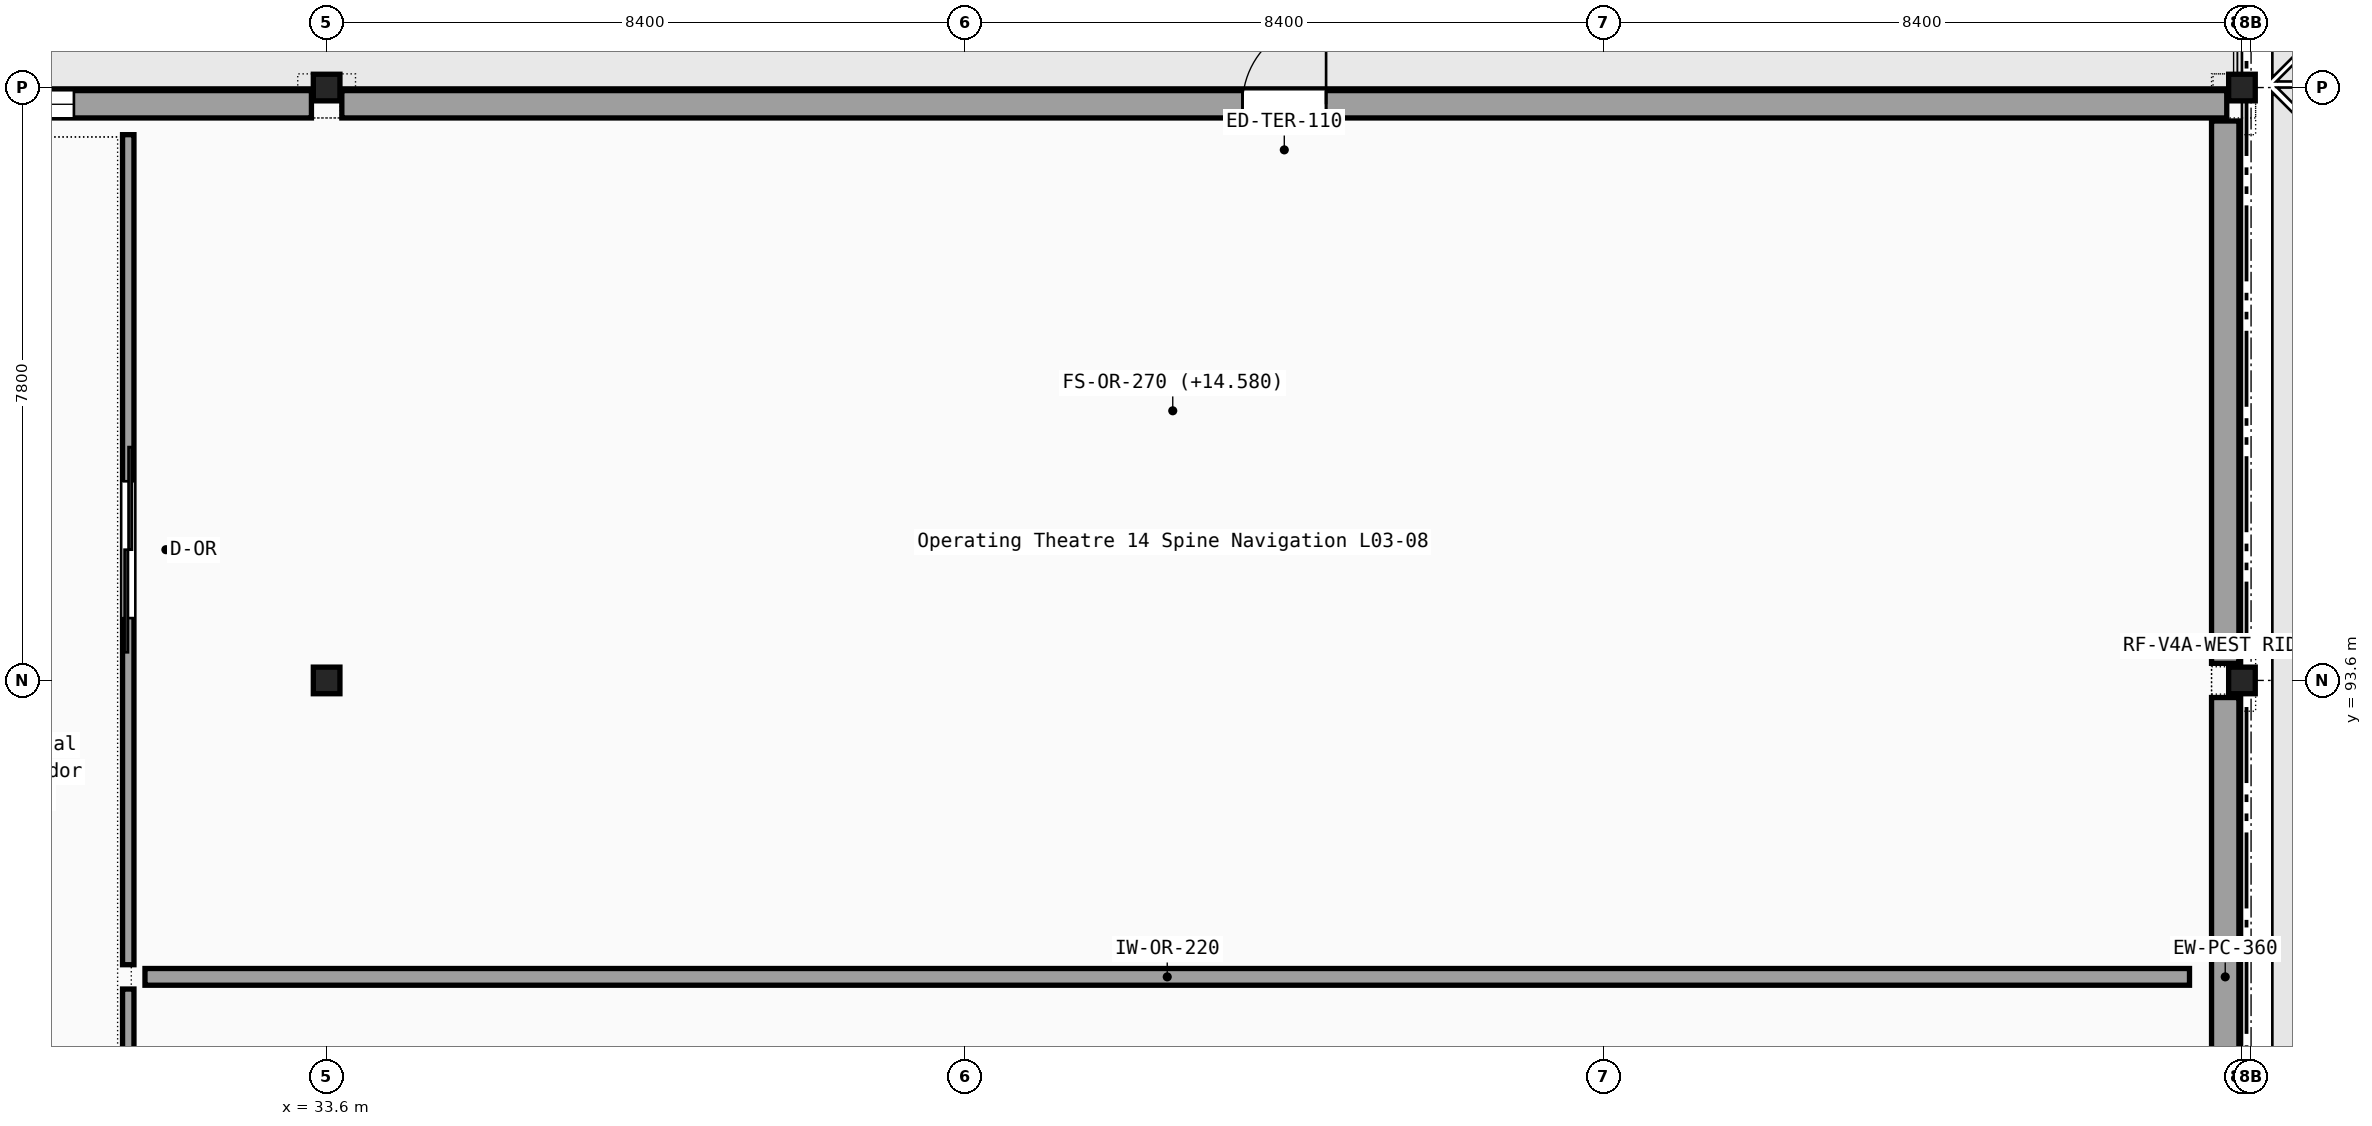
"""IFC4 building model, lengths in metres.
Left out: names, types, materials, properties, quantities, classifications, styles, units other than length and angle.
Written with IfcOpenShell. Run it as: python <this file> out.ifc"""

import sys

from ifc_helpers import new_model, si_unit, direction, frame, frame_2d, origin, origin_2d, place, context, subcontext, project, spatial, rectangle, i_section, extrude, element, fill, save


model = new_model("IFC4")
c1 = context("Model", 3, precision=1e-05, world=origin(), true_north=direction((0.0, 1.0)))
c2 = subcontext(c1, "Body", "Model", "MODEL_VIEW")
j1 = project(units=[si_unit("LENGTHUNIT", "METRE"), si_unit("PLANEANGLEUNIT", "RADIAN")], contexts=[c1])
p1 = place(None, origin())
s1 = spatial("IfcSite", under=j1, at=p1, CompositionType="ELEMENT")
p2 = place(p1, origin())
s2 = spatial("IfcBuilding", under=s1, at=p2, CompositionType="ELEMENT")
p3 = place(p2, frame((0.0, 0.0, 14.85)))
s3 = spatial("IfcBuildingStorey", under=s2, at=p3, CompositionType="ELEMENT", Elevation=14.85)
for number, where, z_axis, x_axis in (
    (1, (33.6, 93.6, 0.0), (0.0, 0.0, 1.0), (1.0, 0.0, 0.0)),
    (2, (33.6, 101.4, 0.0), (0.0, 0.0, 1.0), (1.0, 0.0, 0.0)),
    (3, (58.8, 93.6, 0.0), (0.0, 0.0, 1.0), (1.0, 0.0, 0.0)),
    (4, (58.8, 101.4, 0.0), (0.0, 0.0, 1.0), (1.0, 0.0, 0.0)),
):
    element("IfcColumn", number, at=place(p3, frame(where, z_axis=z_axis, x_axis=x_axis)), inside=s3, PredefinedType="COLUMN", context=c2, shape_type="SweptSolid", body=[
        extrude(i_section(OverallWidth=0.3, OverallDepth=0.35, WebThickness=0.01, FlangeThickness=0.018, FilletRadius=0.027, at=origin_2d()), origin(), (0.0, 0.0, 1.0), 4.05),
    ])
p4 = place(p3, frame((25.4, 101.18, 0.0), z_axis=(0.0, 0.0, 1.0), x_axis=(1.0, 0.0, 0.0)))
e5 = element("IfcWall", 5, at=p4, inside=s3, PredefinedType="SOLIDWALL", context=c2, shape_type="SweptSolid", body=[
    extrude(rectangle(XDim=8.0, YDim=0.36, at=frame_2d((4.0, 0.0))), origin(), (0.0, 0.0, 1.0), 3.44),
])
p5 = place(p4, frame((3.125, 0.0, 0.75)))
e6 = element("IfcOpeningElement", 6, at=p5, cuts=e5, PredefinedType="OPENING", context=c2, shape_type="SweptSolid", body=[
    extrude(rectangle(XDim=1.75, YDim=1.9, at=frame_2d((0.875, 0.95))), frame((0.0, 0.19, 0.0), z_axis=(0.0, -1.0, 0.0), x_axis=(1.0, 0.0, 0.0)), (0.0, 0.0, 1.0), 0.38),
])
p6 = place(p3, frame((33.8, 101.18, 0.0), z_axis=(0.0, 0.0, 1.0), x_axis=(1.0, 0.0, 0.0)))
e7 = element("IfcWall", 7, at=p6, inside=s3, PredefinedType="SOLIDWALL", context=c2, shape_type="SweptSolid", body=[
    extrude(rectangle(XDim=24.8, YDim=0.36, at=frame_2d((12.4, 0.0))), origin(), (0.0, 0.0, 1.0), 3.44),
])
p7 = place(p6, frame((11.85, 0.0, 0.0)))
e8 = element("IfcOpeningElement", 8, at=p7, cuts=e7, PredefinedType="OPENING", context=c2, shape_type="SweptSolid", body=[
    extrude(rectangle(XDim=1.1, YDim=2.2, at=frame_2d((0.55, 1.1))), frame((0.0, 0.19, 0.0), z_axis=(0.0, -1.0, 0.0), x_axis=(1.0, 0.0, 0.0)), (0.0, 0.0, 1.0), 0.38),
])
p8 = place(p3, frame((58.58, 86.025, 0.0), z_axis=(0.0, 0.0, 1.0), x_axis=(0.0, 1.0, 0.0)))
e9 = element("IfcWall", 9, at=p8, inside=s3, PredefinedType="SOLIDWALL", context=c2, shape_type="SweptSolid", body=[
    extrude(rectangle(XDim=7.35, YDim=0.36, at=frame_2d((3.675, 0.0))), origin(), (0.0, 0.0, 1.0), 3.44),
])
p9 = place(p3, frame((58.58, 93.825, 0.0), z_axis=(0.0, 0.0, 1.0), x_axis=(0.0, 1.0, 0.0)))
e10 = element("IfcWall", 10, at=p9, inside=s3, PredefinedType="SOLIDWALL", context=c2, shape_type="SweptSolid", body=[
    extrude(rectangle(XDim=7.135, YDim=0.36, at=frame_2d((3.567, 0.0))), origin(), (0.0, 0.0, 1.0), 3.44),
])
p10 = place(p3, frame((30.99, 78.62, 0.0), z_axis=(0.0, 0.0, 1.0), x_axis=(0.0, 1.0, 0.0)))
e11 = element("IfcWall", 11, at=p10, inside=s3, PredefinedType="PARTITIONING", context=c2, shape_type="SweptSolid", body=[
    extrude(rectangle(XDim=10.92, YDim=0.15, at=frame_2d((5.46, 0.0))), origin(), (0.0, 0.0, 1.0), 3.77),
])
p11 = place(p10, frame((4.56, 0.0, 0.0)))
e12 = element("IfcOpeningElement", 12, at=p11, cuts=e11, PredefinedType="OPENING", context=c2, shape_type="SweptSolid", body=[
    extrude(rectangle(XDim=1.8, YDim=2.4, at=frame_2d((0.9, 1.2))), frame((0.0, 0.085, 0.0), z_axis=(0.0, -1.0, 0.0), x_axis=(1.0, 0.0, 0.0)), (0.0, 0.0, 1.0), 0.17),
])
p12 = place(p3, frame((31.21, 89.7, 0.0), z_axis=(0.0, 0.0, 1.0), x_axis=(1.0, 0.0, 0.0)))
e13 = element("IfcWall", 13, at=p12, inside=s3, PredefinedType="PARTITIONING", context=c2, shape_type="SweptSolid", body=[
    extrude(rectangle(XDim=26.9, YDim=0.22, at=frame_2d((13.45, 0.0))), origin(), (0.0, 0.0, 1.0), 3.77),
])
p13 = place(p3, frame((30.99, 89.86, 0.0), z_axis=(0.0, 0.0, 1.0), x_axis=(0.0, 1.0, 0.0)))
e14 = element("IfcWall", 14, at=p13, inside=s3, PredefinedType="PARTITIONING", context=c2, shape_type="SweptSolid", body=[
    extrude(rectangle(XDim=10.92, YDim=0.15, at=frame_2d((5.46, 0.0))), origin(), (0.0, 0.0, 1.0), 3.44),
])
p14 = place(p13, frame((4.56, 0.0, 0.0)))
e15 = element("IfcOpeningElement", 15, at=p14, cuts=e14, PredefinedType="OPENING", context=c2, shape_type="SweptSolid", body=[
    extrude(rectangle(XDim=1.8, YDim=2.4, at=frame_2d((0.9, 1.2))), frame((0.0, 0.085, 0.0), z_axis=(0.0, -1.0, 0.0), x_axis=(1.0, 0.0, 0.0)), (0.0, 0.0, 1.0), 0.17),
])
p15 = place(p5, origin())
e16 = element("IfcWindow", 16, at=p15, inside=s3, PartitioningType="SINGLE_PANEL", PredefinedType="WINDOW", context=c2, shape_type="SweptSolid", body=[
    extrude(rectangle(XDim=1.75, YDim=1.9, at=frame_2d((0.875, 0.95))), frame((0.0, 0.03, 0.0), z_axis=(0.0, -1.0, 0.0), x_axis=(1.0, 0.0, 0.0)), (0.0, 0.0, 1.0), 0.06),
])
fill(e6, e16)
p16 = place(p7, origin())
e17 = element("IfcDoor", 17, at=p16, inside=s3, OperationType="SINGLE_SWING_RIGHT", PredefinedType="DOOR", context=c2, shape_type="SweptSolid", body=[
    extrude(rectangle(XDim=1.1, YDim=2.2, at=frame_2d((0.55, 1.1))), frame((0.0, 0.025, 0.0), z_axis=(0.0, -1.0, 0.0), x_axis=(1.0, 0.0, 0.0)), (0.0, 0.0, 1.0), 0.05),
])
fill(e8, e17)
p17 = place(p14, origin())
e18 = element("IfcDoor", 18, at=p17, inside=s3, OperationType="DOUBLE_DOOR_SLIDING", PredefinedType="DOOR", context=c2, shape_type="SweptSolid", body=[
    extrude(rectangle(XDim=1.8, YDim=2.4, at=frame_2d((0.9, 1.2))), frame((0.0, 0.025, 0.0), z_axis=(0.0, -1.0, 0.0), x_axis=(1.0, 0.0, 0.0)), (0.0, 0.0, 1.0), 0.05),
])
fill(e15, e18)
save(model, sys.argv[1])
